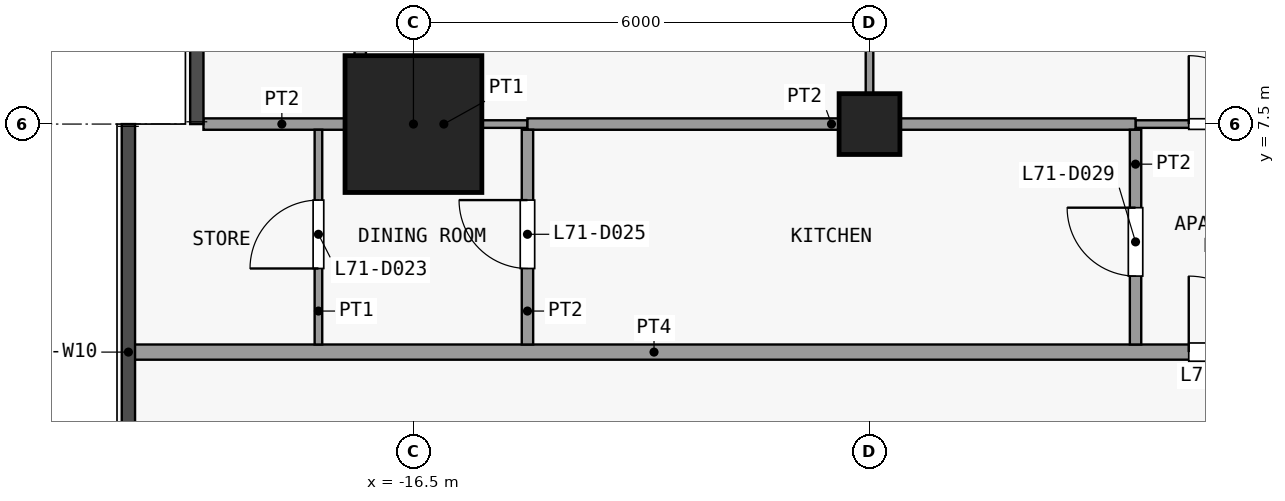
"""IFC4 building model, lengths in metres.
Left out: names, types, materials, properties, quantities, classifications, styles, units other than length and angle.
Written with IfcOpenShell. Run it as: python <this file> out.ifc"""

import sys

from ifc_helpers import new_model, si_unit, direction, frame, frame_2d, origin, origin_2d, place, context, subcontext, project, spatial, rectangle, extrude, element, fill, save


model = new_model("IFC4")
c1 = context("Model", 3, precision=1e-05, world=origin(), true_north=direction((0.0, 1.0)))
c2 = subcontext(c1, "Body", "Model", "MODEL_VIEW")
j1 = project(units=[si_unit("LENGTHUNIT", "METRE"), si_unit("PLANEANGLEUNIT", "RADIAN")], contexts=[c1])
p1 = place(None, origin())
s1 = spatial("IfcSite", under=j1, at=p1, CompositionType="ELEMENT")
p2 = place(p1, origin())
s2 = spatial("IfcBuilding", under=s1, at=p2, CompositionType="ELEMENT")
p3 = place(p2, frame((0.0, 0.0, 280.7)))
s3 = spatial("IfcBuildingStorey", under=s2, at=p3, CompositionType="ELEMENT", Elevation=280.7)
p4 = place(p3, frame((-16.5, 7.5, 0.0), z_axis=(0.0, 0.0, 1.0), x_axis=(1.0, 0.0, 0.0)))
e1 = element("IfcColumn", 1, at=p4, inside=s3, PredefinedType="COLUMN", context=c2, shape_type="SweptSolid", body=[
    extrude(rectangle(XDim=1.8, YDim=1.8, at=origin_2d()), origin(), (0.0, 0.0, 1.0), 3.6),
])
p5 = place(p3, frame((-10.5, 7.5, 0.0), z_axis=(0.0, 0.0, 1.0), x_axis=(1.0, 0.0, 0.0)))
e2 = element("IfcColumn", 2, at=p5, inside=s3, PredefinedType="COLUMN", context=c2, shape_type="SweptSolid", body=[
    extrude(rectangle(XDim=0.8, YDim=0.8, at=origin_2d()), origin(), (0.0, 0.0, 1.0), 3.6),
])
p6 = place(p3, frame((-20.25, 4.5, 0.0), z_axis=(0.0, 0.0, 1.0), x_axis=(1.0, 0.0, 0.0)))
e3 = element("IfcWall", 3, at=p6, inside=s3, PredefinedType="PARTITIONING", context=c2, shape_type="SweptSolid", body=[
    extrude(rectangle(XDim=38.1, YDim=0.2, at=frame_2d((19.05, 0.0))), origin(), (0.0, 0.0, 1.0), 3.3),
])
p7 = place(p6, frame((13.95, 0.0, 0.0)))
e4 = element("IfcOpeningElement", 4, at=p7, cuts=e3, PredefinedType="OPENING", context=c2, shape_type="SweptSolid", body=[
    extrude(rectangle(XDim=1.0, YDim=2.1, at=frame_2d((0.5, 1.05))), frame((0.0, 0.11, 0.0), z_axis=(0.0, -1.0, 0.0), x_axis=(1.0, 0.0, 0.0)), (0.0, 0.0, 1.0), 0.22),
])
p8 = place(p6, frame((27.95, 0.0, 0.0)))
e5 = element("IfcOpeningElement", 5, at=p8, cuts=e3, PredefinedType="OPENING", context=c2, shape_type="SweptSolid", body=[
    extrude(rectangle(XDim=1.0, YDim=2.1, at=frame_2d((0.5, 1.05))), frame((0.0, 0.11, 0.0), z_axis=(0.0, -1.0, 0.0), x_axis=(1.0, 0.0, 0.0)), (0.0, 0.0, 1.0), 0.22),
])
p9 = place(p3, frame((-17.2, 7.5, 0.0), z_axis=(0.0, 0.0, 1.0), x_axis=(1.0, 0.0, 0.0)))
e6 = element("IfcWall", 6, at=p9, inside=s3, PredefinedType="PARTITIONING", context=c2, shape_type="SweptSolid", body=[
    extrude(rectangle(XDim=2.2, YDim=0.1, at=frame_2d((1.1, 0.0))), origin(), (0.0, 0.0, 1.0), 3.3),
])
p10 = place(p3, frame((-7.0, 7.5, 0.0), z_axis=(0.0, 0.0, 1.0), x_axis=(1.0, 0.0, 0.0)))
e7 = element("IfcWall", 7, at=p10, inside=s3, PredefinedType="PARTITIONING", context=c2, shape_type="SweptSolid", body=[
    extrude(rectangle(XDim=2.4, YDim=0.1, at=frame_2d((1.2, 0.0))), origin(), (0.0, 0.0, 1.0), 3.3),
])
p11 = place(p10, frame((0.7, 0.0, 0.0)))
e8 = element("IfcOpeningElement", 8, at=p11, cuts=e7, PredefinedType="OPENING", context=c2, shape_type="SweptSolid", body=[
    extrude(rectangle(XDim=0.9, YDim=2.1, at=frame_2d((0.45, 1.05))), frame((0.0, 0.06, 0.0), z_axis=(0.0, -1.0, 0.0), x_axis=(1.0, 0.0, 0.0)), (0.0, 0.0, 1.0), 0.12),
])
p12 = place(p3, frame((-19.262, 7.5, 0.0), z_axis=(0.0, 0.0, 1.0), x_axis=(1.0, 0.0, 0.0)))
e9 = element("IfcWall", 9, at=p12, inside=s3, PredefinedType="PARTITIONING", context=c2, shape_type="SweptSolid", body=[
    extrude(rectangle(XDim=2.062, YDim=0.15, at=frame_2d((1.031, 0.0))), origin(), (0.0, 0.0, 1.0), 3.3),
])
p13 = place(p3, frame((-15.0, 7.5, 0.0), z_axis=(0.0, 0.0, 1.0), x_axis=(1.0, 0.0, 0.0)))
e10 = element("IfcWall", 10, at=p13, inside=s3, PredefinedType="PARTITIONING", context=c2, shape_type="SweptSolid", body=[
    extrude(rectangle(XDim=8.0, YDim=0.15, at=frame_2d((4.0, 0.0))), origin(), (0.0, 0.0, 1.0), 3.3),
])
p14 = place(p3, frame((-17.75, 4.6, 0.0), z_axis=(0.0, 0.0, 1.0), x_axis=(0.0, 1.0, 0.0)))
e11 = element("IfcWall", 11, at=p14, inside=s3, PredefinedType="PARTITIONING", context=c2, shape_type="SweptSolid", body=[
    extrude(rectangle(XDim=2.825, YDim=0.1, at=frame_2d((1.413, 0.0))), origin(), (0.0, 0.0, 1.0), 3.3),
])
p15 = place(p14, frame((1.0, 0.0, 0.0)))
e12 = element("IfcOpeningElement", 12, at=p15, cuts=e11, PredefinedType="OPENING", context=c2, shape_type="SweptSolid", body=[
    extrude(rectangle(XDim=0.9, YDim=2.1, at=frame_2d((0.45, 1.05))), frame((0.0, 0.06, 0.0), z_axis=(0.0, -1.0, 0.0), x_axis=(1.0, 0.0, 0.0)), (0.0, 0.0, 1.0), 0.12),
])
p16 = place(p3, frame((-17.2, 7.575, 0.0), z_axis=(0.0, 0.0, 1.0), x_axis=(0.0, 1.0, 0.0)))
e13 = element("IfcWall", 13, at=p16, inside=s3, PredefinedType="PARTITIONING", context=c2, shape_type="SweptSolid", body=[
    extrude(rectangle(XDim=3.775, YDim=0.15, at=frame_2d((1.888, 0.0))), origin(), (0.0, 0.0, 1.0), 3.3),
])
p17 = place(p16, frame((1.4, 0.0, 0.0)))
e14 = element("IfcOpeningElement", 14, at=p17, cuts=e13, PredefinedType="OPENING", context=c2, shape_type="SweptSolid", body=[
    extrude(rectangle(XDim=0.9, YDim=2.1, at=frame_2d((0.45, 1.05))), frame((0.0, 0.085, 0.0), z_axis=(0.0, -1.0, 0.0), x_axis=(1.0, 0.0, 0.0)), (0.0, 0.0, 1.0), 0.17),
])
p18 = place(p3, frame((-15.0, 4.6, 0.0), z_axis=(0.0, 0.0, 1.0), x_axis=(0.0, 1.0, 0.0)))
e15 = element("IfcWall", 15, at=p18, inside=s3, PredefinedType="PARTITIONING", context=c2, shape_type="SweptSolid", body=[
    extrude(rectangle(XDim=2.825, YDim=0.15, at=frame_2d((1.413, 0.0))), origin(), (0.0, 0.0, 1.0), 3.3),
])
p19 = place(p18, frame((1.0, 0.0, 0.0)))
e16 = element("IfcOpeningElement", 16, at=p19, cuts=e15, PredefinedType="OPENING", context=c2, shape_type="SweptSolid", body=[
    extrude(rectangle(XDim=0.9, YDim=2.1, at=frame_2d((0.45, 1.05))), frame((0.0, 0.085, 0.0), z_axis=(0.0, -1.0, 0.0), x_axis=(1.0, 0.0, 0.0)), (0.0, 0.0, 1.0), 0.17),
])
p20 = place(p3, frame((-10.5, 7.575, 0.0), z_axis=(0.0, 0.0, 1.0), x_axis=(0.0, 1.0, 0.0)))
e17 = element("IfcWall", 17, at=p20, inside=s3, PredefinedType="PARTITIONING", context=c2, shape_type="SweptSolid", body=[
    extrude(rectangle(XDim=7.275, YDim=0.1, at=frame_2d((3.638, 0.0))), origin(), (0.0, 0.0, 1.0), 3.3),
])
p21 = place(p20, frame((2.0, 0.0, 0.0)))
e18 = element("IfcOpeningElement", 18, at=p21, cuts=e17, PredefinedType="OPENING", context=c2, shape_type="SweptSolid", body=[
    extrude(rectangle(XDim=0.9, YDim=2.1, at=frame_2d((0.45, 1.05))), frame((0.0, 0.06, 0.0), z_axis=(0.0, -1.0, 0.0), x_axis=(1.0, 0.0, 0.0)), (0.0, 0.0, 1.0), 0.12),
])
p22 = place(p3, frame((-7.0, 4.6, 0.0), z_axis=(0.0, 0.0, 1.0), x_axis=(0.0, 1.0, 0.0)))
e19 = element("IfcWall", 19, at=p22, inside=s3, PredefinedType="PARTITIONING", context=c2, shape_type="SweptSolid", body=[
    extrude(rectangle(XDim=2.825, YDim=0.15, at=frame_2d((1.413, 0.0))), origin(), (0.0, 0.0, 1.0), 3.3),
])
p23 = place(p22, frame((0.9, 0.0, 0.0)))
e20 = element("IfcOpeningElement", 20, at=p23, cuts=e19, PredefinedType="OPENING", context=c2, shape_type="SweptSolid", body=[
    extrude(rectangle(XDim=0.9, YDim=2.1, at=frame_2d((0.45, 1.05))), frame((0.0, 0.085, 0.0), z_axis=(0.0, -1.0, 0.0), x_axis=(1.0, 0.0, 0.0)), (0.0, 0.0, 1.0), 0.17),
])
p24 = place(p7, origin())
e21 = element("IfcDoor", 21, at=p24, inside=s3, OperationType="SINGLE_SWING_RIGHT", PredefinedType="DOOR", context=c2, shape_type="SweptSolid", body=[
    extrude(rectangle(XDim=1.0, YDim=2.1, at=frame_2d((0.5, 1.05))), frame((0.0, 0.025, 0.0), z_axis=(0.0, -1.0, 0.0), x_axis=(1.0, 0.0, 0.0)), (0.0, 0.0, 1.0), 0.05),
])
fill(e4, e21)
p25 = place(p11, origin())
e22 = element("IfcDoor", 22, at=p25, inside=s3, OperationType="SINGLE_SWING_RIGHT", PredefinedType="DOOR", context=c2, shape_type="SweptSolid", body=[
    extrude(rectangle(XDim=0.9, YDim=2.1, at=frame_2d((0.45, 1.05))), frame((0.0, 0.025, 0.0), z_axis=(0.0, -1.0, 0.0), x_axis=(1.0, 0.0, 0.0)), (0.0, 0.0, 1.0), 0.05),
])
fill(e8, e22)
p26 = place(p15, origin())
e23 = element("IfcDoor", 23, at=p26, inside=s3, OperationType="SINGLE_SWING_RIGHT", PredefinedType="DOOR", context=c2, shape_type="SweptSolid", body=[
    extrude(rectangle(XDim=0.9, YDim=2.1, at=frame_2d((0.45, 1.05))), frame((0.0, 0.025, 0.0), z_axis=(0.0, -1.0, 0.0), x_axis=(1.0, 0.0, 0.0)), (0.0, 0.0, 1.0), 0.05),
])
fill(e12, e23)
p27 = place(p19, origin())
e24 = element("IfcDoor", 24, at=p27, inside=s3, OperationType="SINGLE_SWING_LEFT", PredefinedType="DOOR", context=c2, shape_type="SweptSolid", body=[
    extrude(rectangle(XDim=0.9, YDim=2.1, at=frame_2d((0.45, 1.05))), frame((0.0, 0.025, 0.0), z_axis=(0.0, -1.0, 0.0), x_axis=(1.0, 0.0, 0.0)), (0.0, 0.0, 1.0), 0.05),
])
fill(e16, e24)
p28 = place(p23, origin())
e25 = element("IfcDoor", 25, at=p28, inside=s3, OperationType="SINGLE_SWING_LEFT", PredefinedType="DOOR", context=c2, shape_type="SweptSolid", body=[
    extrude(rectangle(XDim=0.9, YDim=2.1, at=frame_2d((0.45, 1.05))), frame((0.0, 0.025, 0.0), z_axis=(0.0, -1.0, 0.0), x_axis=(1.0, 0.0, 0.0)), (0.0, 0.0, 1.0), 0.05),
])
fill(e20, e25)
save(model, sys.argv[1])
